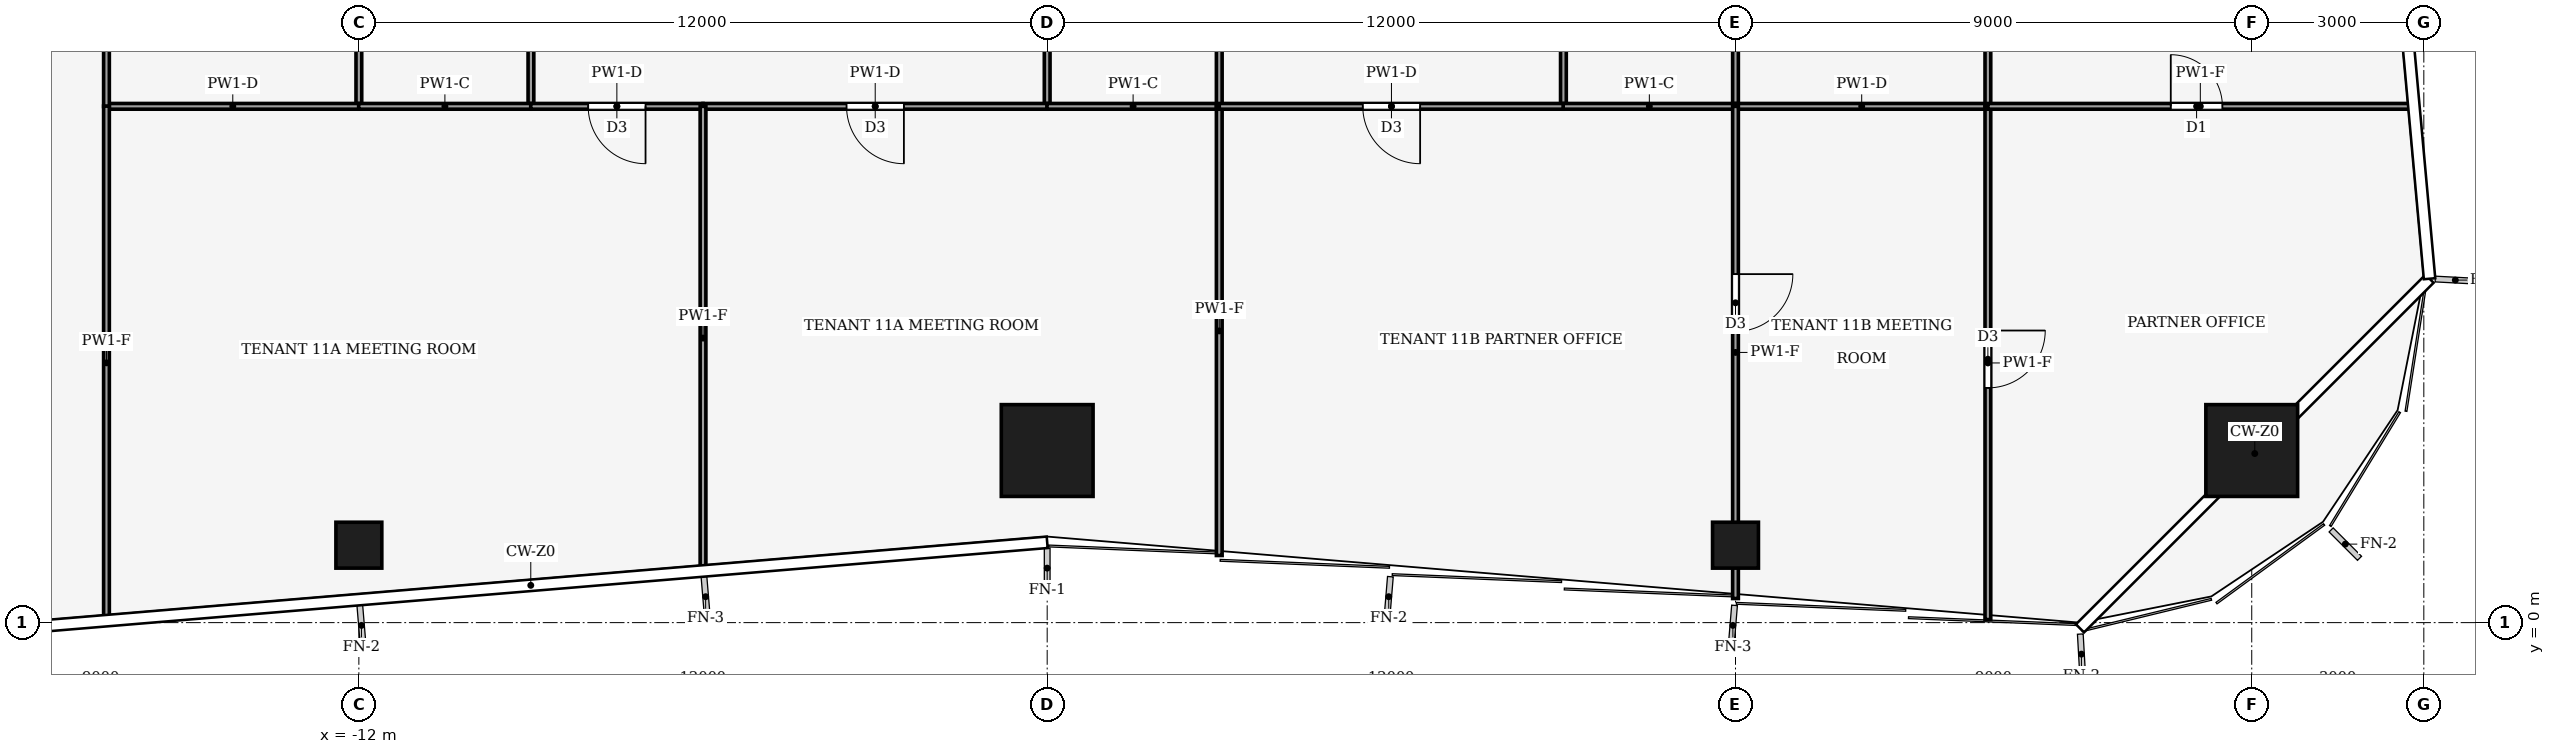
"""IFC4 building model, lengths in metres.
Left out: names, types, materials, properties, quantities, classifications, styles, units other than length and angle.
Written with IfcOpenShell. Run it as: python <this file> out.ifc"""

import sys

from ifc_helpers import new_model, si_unit, direction, frame, frame_2d, origin, origin_2d, place, context, subcontext, project, spatial, rectangle, hollow_rectangle, extrude, element, fill, save


model = new_model("IFC4")
c1 = context("Model", 3, precision=1e-05, world=origin(), true_north=direction((0.0, 1.0)))
c2 = subcontext(c1, "Body", "Model", "MODEL_VIEW")
j1 = project(units=[si_unit("LENGTHUNIT", "METRE"), si_unit("PLANEANGLEUNIT", "RADIAN")], contexts=[c1])
p1 = place(None, origin())
s1 = spatial("IfcSite", under=j1, at=p1, CompositionType="ELEMENT")
p2 = place(p1, origin())
s2 = spatial("IfcBuilding", under=s1, at=p2, CompositionType="ELEMENT")
p3 = place(p2, frame((0.0, 0.0, 50.0)))
s3 = spatial("IfcBuildingStorey", under=s2, at=p3, CompositionType="ELEMENT", Elevation=50.0)
for number, where, z_axis, x_axis in (
    (1, (21.0, 3.0, 0.0), (0.0, 0.0, 1.0), (1.0, 0.0, 0.0)),
    (2, (0.0, 3.0, 0.0), (0.0, 0.0, 1.0), (1.0, 0.0, 0.0)),
):
    element("IfcColumn", number, at=place(p3, frame(where, z_axis=z_axis, x_axis=x_axis)), inside=s3, PredefinedType="COLUMN", context=c2, shape_type="SweptSolid", body=[
        extrude(hollow_rectangle(XDim=1.6, YDim=1.6, WallThickness=0.09, at=origin_2d()), origin(), (0.0, 0.0, 1.0), 4.0),
    ])
for number, where, z_axis, x_axis in (
    (3, (-12.0, 1.35, 0.0), (0.0, 0.0, 1.0), (1.0, 0.0, 0.0)),
    (4, (12.0, 1.35, 0.0), (0.0, 0.0, 1.0), (1.0, 0.0, 0.0)),
):
    element("IfcColumn", number, at=place(p3, frame(where, z_axis=z_axis, x_axis=x_axis)), inside=s3, PredefinedType="COLUMN", context=c2, shape_type="SweptSolid", body=[
        extrude(hollow_rectangle(XDim=0.8, YDim=0.8, WallThickness=0.04, at=origin_2d()), origin(), (0.0, 0.0, 1.0), 4.0),
    ])
p4 = place(p3, frame((-12.0, 9.0, 0.0), z_axis=(0.0, 0.0, 1.0), x_axis=(0.0, 1.0, 0.0)))
e5 = element("IfcWall", 5, at=p4, inside=s3, PredefinedType="PARTITIONING", context=c2, shape_type="SweptSolid", body=[
    extrude(rectangle(XDim=5.6, YDim=0.1, at=frame_2d((2.8, 0.0))), origin(), (0.0, 0.0, 1.0), 3.29),
])
p5 = place(p3, frame((-16.4, 9.0, 0.0), z_axis=(0.0, 0.0, 1.0), x_axis=(1.0, 0.0, 0.0)))
e6 = element("IfcWall", 6, at=p5, inside=s3, PredefinedType="PARTITIONING", context=c2, shape_type="SweptSolid", body=[
    extrude(rectangle(XDim=4.404, YDim=0.1, at=frame_2d((2.202, 0.0))), origin(), (0.0, 0.0, 1.0), 3.29),
])
p6 = place(p3, frame((-16.4, 14.604, 0.0), z_axis=(0.0, 0.0, 1.0), x_axis=(0.0, -1.0, 0.0)))
e7 = element("IfcWall", 7, at=p6, inside=s3, PredefinedType="PARTITIONING", context=c2, shape_type="SweptSolid", body=[
    extrude(rectangle(XDim=5.608, YDim=0.1, at=frame_2d((2.804, 0.0))), origin(), (0.0, 0.0, 1.0), 3.87),
])
p7 = place(p3, frame((-9.0, 9.0, 0.0), z_axis=(0.0, 0.0, 1.0), x_axis=(0.0, 1.0, 0.0)))
e8 = element("IfcWall", 8, at=p7, inside=s3, PredefinedType="PARTITIONING", context=c2, shape_type="SweptSolid", body=[
    extrude(rectangle(XDim=5.6, YDim=0.1, at=frame_2d((2.8, 0.0))), origin(), (0.0, 0.0, 1.0), 3.87),
])
p8 = place(p7, frame((2.3, 0.0, 0.0)))
e9 = element("IfcOpeningElement", 9, at=p8, cuts=e8, PredefinedType="OPENING", context=c2, shape_type="SweptSolid", body=[
    extrude(rectangle(XDim=1.0, YDim=2.1, at=frame_2d((0.5, 1.05))), frame((0.0, 0.06, 0.0), z_axis=(0.0, -1.0, 0.0), x_axis=(1.0, 0.0, 0.0)), (0.0, 0.0, 1.0), 0.12),
])
p9 = place(p3, frame((-12.004, 9.0, 0.0), z_axis=(0.0, 0.0, 1.0), x_axis=(1.0, 0.0, 0.0)))
e10 = element("IfcWall", 10, at=p9, inside=s3, PredefinedType="PARTITIONING", context=c2, shape_type="SweptSolid", body=[
    extrude(rectangle(XDim=3.008, YDim=0.1, at=frame_2d((1.504, 0.0))), origin(), (0.0, 0.0, 1.0), 3.87),
])
p10 = place(p3, frame((0.0, 9.0, 0.0), z_axis=(0.0, 0.0, 1.0), x_axis=(0.0, 1.0, 0.0)))
e11 = element("IfcWall", 11, at=p10, inside=s3, PredefinedType="PARTITIONING", context=c2, shape_type="SweptSolid", body=[
    extrude(rectangle(XDim=5.6, YDim=0.1, at=frame_2d((2.8, 0.0))), origin(), (0.0, 0.0, 1.0), 3.34),
])
p11 = place(p3, frame((-6.0, 9.0, 0.0), z_axis=(0.0, 0.0, 1.0), x_axis=(-1.0, 0.0, 0.0)))
e12 = element("IfcWall", 12, at=p11, inside=s3, PredefinedType="PARTITIONING", context=c2, shape_type="SweptSolid", body=[
    extrude(rectangle(XDim=3.004, YDim=0.1, at=frame_2d((1.502, 0.0))), origin(), (0.0, 0.0, 1.0), 3.29),
])
p12 = place(p11, frame((1.002, 0.0, 0.0)))
e13 = element("IfcOpeningElement", 13, at=p12, cuts=e12, PredefinedType="OPENING", context=c2, shape_type="SweptSolid", body=[
    extrude(rectangle(XDim=1.0, YDim=2.1, at=frame_2d((0.5, 1.05))), frame((0.0, 0.06, 0.0), z_axis=(0.0, -1.0, 0.0), x_axis=(1.0, 0.0, 0.0)), (0.0, 0.0, 1.0), 0.12),
])
p13 = place(p3, frame((0.004, 9.0, 0.0), z_axis=(0.0, 0.0, 1.0), x_axis=(-1.0, 0.0, 0.0)))
e14 = element("IfcWall", 14, at=p13, inside=s3, PredefinedType="PARTITIONING", context=c2, shape_type="SweptSolid", body=[
    extrude(rectangle(XDim=6.004, YDim=0.1, at=frame_2d((3.002, 0.0))), origin(), (0.0, 0.0, 1.0), 3.29),
])
p14 = place(p13, frame((2.502, 0.0, 0.0)))
e15 = element("IfcOpeningElement", 15, at=p14, cuts=e14, PredefinedType="OPENING", context=c2, shape_type="SweptSolid", body=[
    extrude(rectangle(XDim=1.0, YDim=2.1, at=frame_2d((0.5, 1.05))), frame((0.0, 0.06, 0.0), z_axis=(0.0, -1.0, 0.0), x_axis=(1.0, 0.0, 0.0)), (0.0, 0.0, 1.0), 0.12),
])
p15 = place(p3, frame((-0.004, 9.0, 0.0), z_axis=(0.0, 0.0, 1.0), x_axis=(1.0, 0.0, 0.0)))
e16 = element("IfcWall", 16, at=p15, inside=s3, PredefinedType="PARTITIONING", context=c2, shape_type="SweptSolid", body=[
    extrude(rectangle(XDim=3.004, YDim=0.1, at=frame_2d((1.502, 0.0))), origin(), (0.0, 0.0, 1.0), 3.87),
])
p16 = place(p3, frame((3.0, 9.0, 0.0), z_axis=(0.0, 0.0, 1.0), x_axis=(0.0, 1.0, 0.0)))
e17 = element("IfcWall", 17, at=p16, inside=s3, PredefinedType="PARTITIONING", context=c2, shape_type="SweptSolid", body=[
    extrude(rectangle(XDim=5.6, YDim=0.1, at=frame_2d((2.8, 0.0))), origin(), (0.0, 0.0, 1.0), 3.87),
])
p17 = place(p3, frame((-6.0, 0.92, 0.0), z_axis=(0.0, 0.0, 1.0), x_axis=(0.0, 1.0, 0.0)))
e18 = element("IfcWall", 18, at=p17, inside=s3, PredefinedType="PARTITIONING", context=c2, shape_type="SweptSolid", body=[
    extrude(rectangle(XDim=8.08, YDim=0.1, at=frame_2d((4.04, 0.0))), origin(), (0.0, 0.0, 1.0), 3.04),
])
p18 = place(p3, frame((-16.4, 9.004, 0.0), z_axis=(0.0, 0.0, 1.0), x_axis=(0.0, -1.0, 0.0)))
e19 = element("IfcWall", 19, at=p18, inside=s3, PredefinedType="PARTITIONING", context=c2, shape_type="SweptSolid", body=[
    extrude(rectangle(XDim=8.951, YDim=0.1, at=frame_2d((4.475, 0.0))), origin(), (0.0, 0.0, 1.0), 3.04),
])
p19 = place(p3, frame((3.0, 1.17, 0.0), z_axis=(0.0, 0.0, 1.0), x_axis=(0.0, 1.0, 0.0)))
e20 = element("IfcWall", 20, at=p19, inside=s3, PredefinedType="PARTITIONING", context=c2, shape_type="SweptSolid", body=[
    extrude(rectangle(XDim=7.83, YDim=0.1, at=frame_2d((3.915, 0.0))), origin(), (0.0, 0.0, 1.0), 3.04),
])
p20 = place(p3, frame((9.0, 14.6, 0.0), z_axis=(0.0, 0.0, 1.0), x_axis=(0.0, -1.0, 0.0)))
e21 = element("IfcWall", 21, at=p20, inside=s3, PredefinedType="PARTITIONING", context=c2, shape_type="SweptSolid", body=[
    extrude(rectangle(XDim=5.6, YDim=0.1, at=frame_2d((2.8, 0.0))), origin(), (0.0, 0.0, 1.0), 3.87),
])
p21 = place(p20, frame((2.3, 0.0, 0.0)))
e22 = element("IfcOpeningElement", 22, at=p21, cuts=e21, PredefinedType="OPENING", context=c2, shape_type="SweptSolid", body=[
    extrude(rectangle(XDim=1.0, YDim=2.1, at=frame_2d((0.5, 1.05))), frame((0.0, 0.06, 0.0), z_axis=(0.0, -1.0, 0.0), x_axis=(1.0, 0.0, 0.0)), (0.0, 0.0, 1.0), 0.12),
])
p22 = place(p3, frame((9.004, 9.0, 0.0), z_axis=(0.0, 0.0, 1.0), x_axis=(-1.0, 0.0, 0.0)))
e23 = element("IfcWall", 23, at=p22, inside=s3, PredefinedType="PARTITIONING", context=c2, shape_type="SweptSolid", body=[
    extrude(rectangle(XDim=6.004, YDim=0.1, at=frame_2d((3.002, 0.0))), origin(), (0.0, 0.0, 1.0), 3.29),
])
p23 = place(p22, frame((2.502, 0.0, 0.0)))
e24 = element("IfcOpeningElement", 24, at=p23, cuts=e23, PredefinedType="OPENING", context=c2, shape_type="SweptSolid", body=[
    extrude(rectangle(XDim=1.0, YDim=2.1, at=frame_2d((0.5, 1.05))), frame((0.0, 0.06, 0.0), z_axis=(0.0, -1.0, 0.0), x_axis=(1.0, 0.0, 0.0)), (0.0, 0.0, 1.0), 0.12),
])
p24 = place(p3, frame((12.0, 9.0, 0.0), z_axis=(0.0, 0.0, 1.0), x_axis=(0.0, 1.0, 0.0)))
e25 = element("IfcWall", 25, at=p24, inside=s3, PredefinedType="PARTITIONING", context=c2, shape_type="SweptSolid", body=[
    extrude(rectangle(XDim=5.6, YDim=0.1, at=frame_2d((2.8, 0.0))), origin(), (0.0, 0.0, 1.0), 3.29),
])
p25 = place(p3, frame((8.996, 9.0, 0.0), z_axis=(0.0, 0.0, 1.0), x_axis=(1.0, 0.0, 0.0)))
e26 = element("IfcWall", 26, at=p25, inside=s3, PredefinedType="PARTITIONING", context=c2, shape_type="SweptSolid", body=[
    extrude(rectangle(XDim=3.004, YDim=0.1, at=frame_2d((1.502, 0.0))), origin(), (0.0, 0.0, 1.0), 3.87),
])
p26 = place(p3, frame((12.0, 9.0, 0.0), z_axis=(0.0, 0.0, 1.0), x_axis=(1.0, 0.0, 0.0)))
e27 = element("IfcWall", 27, at=p26, inside=s3, PredefinedType="PARTITIONING", context=c2, shape_type="SweptSolid", body=[
    extrude(rectangle(XDim=4.4, YDim=0.1, at=frame_2d((2.2, 0.0))), origin(), (0.0, 0.0, 1.0), 3.29),
])
p27 = place(p3, frame((16.4, 9.0, 0.0), z_axis=(0.0, 0.0, 1.0), x_axis=(0.0, 1.0, 0.0)))
e28 = element("IfcWall", 28, at=p27, inside=s3, PredefinedType="PARTITIONING", context=c2, shape_type="SweptSolid", body=[
    extrude(rectangle(XDim=3.0, YDim=0.1, at=frame_2d((1.5, 0.0))), origin(), (0.0, 0.0, 1.0), 3.87),
])
p28 = place(p3, frame((12.0, 9.0, 0.0), z_axis=(0.0, 0.0, 1.0), x_axis=(0.0, -1.0, 0.0)))
e29 = element("IfcWall", 29, at=p28, inside=s3, PredefinedType="PARTITIONING", context=c2, shape_type="SweptSolid", body=[
    extrude(rectangle(XDim=8.58, YDim=0.1, at=frame_2d((4.29, 0.0))), origin(), (0.0, 0.0, 1.0), 3.04),
])
p29 = place(p28, frame((2.925, 0.0, 0.0)))
e30 = element("IfcOpeningElement", 30, at=p29, cuts=e29, PredefinedType="OPENING", context=c2, shape_type="SweptSolid", body=[
    extrude(rectangle(XDim=1.0, YDim=2.1, at=frame_2d((0.5, 1.05))), frame((0.0, 0.06, 0.0), z_axis=(0.0, -1.0, 0.0), x_axis=(1.0, 0.0, 0.0)), (0.0, 0.0, 1.0), 0.12),
])
p30 = place(p3, frame((16.4, 9.0, 0.0), z_axis=(0.0, 0.0, 1.0), x_axis=(0.0, -1.0, 0.0)))
e31 = element("IfcWall", 31, at=p30, inside=s3, PredefinedType="PARTITIONING", context=c2, shape_type="SweptSolid", body=[
    extrude(rectangle(XDim=8.947, YDim=0.1, at=frame_2d((4.473, 0.0))), origin(), (0.0, 0.0, 1.0), 3.04),
])
p31 = place(p30, frame((3.908, 0.0, 0.0)))
e32 = element("IfcOpeningElement", 32, at=p31, cuts=e31, PredefinedType="OPENING", context=c2, shape_type="SweptSolid", body=[
    extrude(rectangle(XDim=1.0, YDim=2.1, at=frame_2d((0.5, 1.05))), frame((0.0, 0.06, 0.0), z_axis=(0.0, -1.0, 0.0), x_axis=(1.0, 0.0, 0.0)), (0.0, 0.0, 1.0), 0.12),
])
p32 = place(p3, frame((16.4, 9.0, 0.0), z_axis=(0.0, 0.0, 1.0), x_axis=(1.0, 0.0, 0.0)))
e33 = element("IfcWall", 33, at=p32, inside=s3, PredefinedType="PARTITIONING", context=c2, shape_type="SweptSolid", body=[
    extrude(rectangle(XDim=7.407, YDim=0.1, at=frame_2d((3.704, 0.0))), origin(), (0.0, 0.0, 1.0), 3.04),
])
p33 = place(p32, frame((3.188, 0.0, 0.0)))
e34 = element("IfcOpeningElement", 34, at=p33, cuts=e33, PredefinedType="OPENING", context=c2, shape_type="SweptSolid", body=[
    extrude(rectangle(XDim=0.9, YDim=2.1, at=frame_2d((0.45, 1.05))), frame((0.0, 0.06, 0.0), z_axis=(0.0, -1.0, 0.0), x_axis=(1.0, 0.0, 0.0)), (0.0, 0.0, 1.0), 0.12),
])
p34 = place(p12, origin())
e35 = element("IfcDoor", 35, at=p34, inside=s3, OperationType="SINGLE_SWING_RIGHT", PredefinedType="DOOR", context=c2, shape_type="SweptSolid", body=[
    extrude(rectangle(XDim=1.0, YDim=2.1, at=frame_2d((0.5, 1.05))), frame((0.0, 0.025, 0.0), z_axis=(0.0, -1.0, 0.0), x_axis=(1.0, 0.0, 0.0)), (0.0, 0.0, 1.0), 0.05),
])
fill(e13, e35)
p35 = place(p14, origin())
e36 = element("IfcDoor", 36, at=p35, inside=s3, OperationType="SINGLE_SWING_LEFT", PredefinedType="DOOR", context=c2, shape_type="SweptSolid", body=[
    extrude(rectangle(XDim=1.0, YDim=2.1, at=frame_2d((0.5, 1.05))), frame((0.0, 0.025, 0.0), z_axis=(0.0, -1.0, 0.0), x_axis=(1.0, 0.0, 0.0)), (0.0, 0.0, 1.0), 0.05),
])
fill(e15, e36)
p36 = place(p23, origin())
e37 = element("IfcDoor", 37, at=p36, inside=s3, OperationType="SINGLE_SWING_LEFT", PredefinedType="DOOR", context=c2, shape_type="SweptSolid", body=[
    extrude(rectangle(XDim=1.0, YDim=2.1, at=frame_2d((0.5, 1.05))), frame((0.0, 0.025, 0.0), z_axis=(0.0, -1.0, 0.0), x_axis=(1.0, 0.0, 0.0)), (0.0, 0.0, 1.0), 0.05),
])
fill(e24, e37)
p37 = place(p29, origin())
e38 = element("IfcDoor", 38, at=p37, inside=s3, OperationType="SINGLE_SWING_LEFT", PredefinedType="DOOR", context=c2, shape_type="SweptSolid", body=[
    extrude(rectangle(XDim=1.0, YDim=2.1, at=frame_2d((0.5, 1.05))), frame((0.0, 0.025, 0.0), z_axis=(0.0, -1.0, 0.0), x_axis=(1.0, 0.0, 0.0)), (0.0, 0.0, 1.0), 0.05),
])
fill(e30, e38)
p38 = place(p31, origin())
e39 = element("IfcDoor", 39, at=p38, inside=s3, OperationType="SINGLE_SWING_LEFT", PredefinedType="DOOR", context=c2, shape_type="SweptSolid", body=[
    extrude(rectangle(XDim=1.0, YDim=2.1, at=frame_2d((0.5, 1.05))), frame((0.0, 0.025, 0.0), z_axis=(0.0, -1.0, 0.0), x_axis=(1.0, 0.0, 0.0)), (0.0, 0.0, 1.0), 0.05),
])
fill(e32, e39)
p39 = place(p33, origin())
e40 = element("IfcDoor", 40, at=p39, inside=s3, OperationType="SINGLE_SWING_LEFT", PredefinedType="DOOR", context=c2, shape_type="SweptSolid", body=[
    extrude(rectangle(XDim=0.9, YDim=2.1, at=frame_2d((0.45, 1.05))), frame((0.0, 0.025, 0.0), z_axis=(0.0, -1.0, 0.0), x_axis=(1.0, 0.0, 0.0)), (0.0, 0.0, 1.0), 0.05),
])
fill(e34, e40)
save(model, sys.argv[1])
